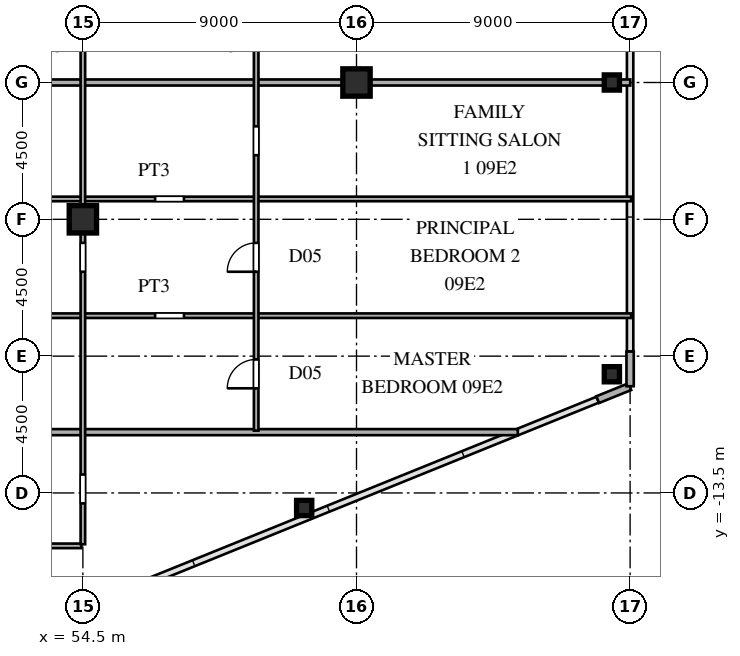
"""IFC4 building model, lengths in metres.
Left out: names, types, materials, properties, quantities, classifications, styles, units other than length and angle.
Written with IfcOpenShell. Run it as: python <this file> out.ifc"""

import sys

from ifc_helpers import new_model, si_unit, direction, frame, frame_2d, origin, origin_2d, place, context, subcontext, project, spatial, rectangle, hollow_rectangle, i_section, extrude, source, transform, mapped, element, fill, save


model = new_model("IFC4")
c1 = context("Model", 3, precision=1e-05, world=origin(), true_north=direction((0.0, 1.0)))
c2 = subcontext(c1, "Body", "Model", "MODEL_VIEW")
j1 = project(units=[si_unit("LENGTHUNIT", "METRE"), si_unit("PLANEANGLEUNIT", "RADIAN")], contexts=[c1])
p1 = place(None, origin())
s1 = spatial("IfcSite", under=j1, at=p1, CompositionType="ELEMENT")
p2 = place(p1, origin())
s2 = spatial("IfcBuilding", under=s1, at=p2, CompositionType="ELEMENT")
p3 = place(p2, frame((0.0, 0.0, 36.9)))
s3 = spatial("IfcBuildingStorey", under=s2, at=p3, CompositionType="ELEMENT", Elevation=36.9)
m1 = source(origin(), c2, "Body", "SweptSolid", [
    extrude(i_section(OverallWidth=0.9, OverallDepth=0.9, WebThickness=0.036, FlangeThickness=0.055, at=origin_2d()), origin(), (0.0, 0.0, 1.0), 3.6),
])
for number, where, z_axis, x_axis in (
    (1, (54.5, -4.5, 0.0), (0.0, 0.0, 1.0), (1.0, 0.0, 0.0)),
    (2, (63.5, 0.0, 0.0), (0.0, 0.0, 1.0), (1.0, 0.0, 0.0)),
):
    element("IfcColumn", number, at=place(p3, frame(where, z_axis=z_axis, x_axis=x_axis)), inside=s3, PredefinedType="COLUMN", context=c2, shape_type="MappedRepresentation", body=[
        mapped(m1, transform((0.0, 0.0, 0.0), scale=1.0)),
    ])
m2 = source(origin(), c2, "Body", "SweptSolid", [
    extrude(hollow_rectangle(XDim=0.5, YDim=0.5, WallThickness=0.02, at=origin_2d()), origin(), (0.0, 0.0, 1.0), 3.6),
])
for number, where, z_axis, x_axis in (
    (3, (71.9, -9.596, 0.0), (0.0, 0.0, 1.0), (1.0, 0.0, 0.0)),
    (4, (61.779, -13.994, 0.0), (0.0, 0.0, 1.0), (1.0, 0.0, 0.0)),
    (5, (71.9, 0.0, 0.0), (0.0, 0.0, 1.0), (1.0, 0.0, 0.0)),
):
    element("IfcColumn", number, at=place(p3, frame(where, z_axis=z_axis, x_axis=x_axis)), inside=s3, PredefinedType="COLUMN", context=c2, shape_type="MappedRepresentation", body=[
        mapped(m2, transform((0.0, 0.0, 0.0), scale=1.0)),
    ])
for number, where, z_axis, x_axis in (
    (6, (71.434, -10.431, 0.0), (0.0, 0.0, 1.0), (0.927, 0.375, 0.0)),
    (7, (72.5, -9.99, 0.0), (0.0, 0.0, 1.0), (0.0, 1.0, 0.0)),
):
    element("IfcWall", number, at=place(p3, frame(where, z_axis=z_axis, x_axis=x_axis)), inside=s3, PredefinedType="SOLIDWALL", context=c2, shape_type="SweptSolid", body=[
        extrude(rectangle(XDim=1.14, YDim=0.24, at=frame_2d((0.57, 0.0))), origin(), (0.0, 0.0, 1.0), 3.38),
    ])
p4 = place(p3, frame((41.15, -15.24, 0.0), z_axis=(0.0, 0.0, 1.0), x_axis=(1.0, 0.0, 0.0)))
e8 = element("IfcWall", 8, at=p4, inside=s3, PredefinedType="PARTITIONING", context=c2, shape_type="SweptSolid", body=[
    extrude(rectangle(XDim=13.3, YDim=0.15, at=frame_2d((6.65, 0.0))), origin(), (0.0, 0.0, 1.0), 3.38),
])
p5 = place(p4, frame((6.175, 0.0, 0.0)))
e9 = element("IfcOpeningElement", 9, at=p5, cuts=e8, PredefinedType="OPENING", context=c2, shape_type="SweptSolid", body=[
    extrude(rectangle(XDim=0.95, YDim=2.15, at=frame_2d((0.475, 1.075))), frame((0.0, 0.085, 0.0), z_axis=(0.0, -1.0, 0.0), x_axis=(1.0, 0.0, 0.0)), (0.0, 0.0, 1.0), 0.17),
])
p6 = place(p3, frame((38.43, -11.5, 0.0), z_axis=(0.0, 0.0, 1.0), x_axis=(1.0, 0.0, 0.0)))
e10 = element("IfcWall", 10, at=p6, inside=s3, PredefinedType="PARTITIONING", context=c2, shape_type="SweptSolid", body=[
    extrude(rectangle(XDim=30.377, YDim=0.2, at=frame_2d((15.188, 0.0))), origin(), (0.0, 0.0, 1.0), 3.38),
])
p7 = place(p3, frame((41.15, -7.67, 0.0), z_axis=(0.0, 0.0, 1.0), x_axis=(1.0, 0.0, 0.0)))
e11 = element("IfcWall", 11, at=p7, inside=s3, PredefinedType="PARTITIONING", context=c2, shape_type="SweptSolid", body=[
    extrude(rectangle(XDim=31.385, YDim=0.15, at=frame_2d((15.692, 0.0))), origin(), (0.0, 0.0, 1.0), 3.38),
])
p8 = place(p7, frame((6.175, 0.0, 0.0)))
e12 = element("IfcOpeningElement", 12, at=p8, cuts=e11, PredefinedType="OPENING", context=c2, shape_type="SweptSolid", body=[
    extrude(rectangle(XDim=0.95, YDim=2.15, at=frame_2d((0.475, 1.075))), frame((0.0, 0.085, 0.0), z_axis=(0.0, -1.0, 0.0), x_axis=(1.0, 0.0, 0.0)), (0.0, 0.0, 1.0), 0.17),
])
p9 = place(p7, frame((15.725, 0.0, 0.0)))
e13 = element("IfcOpeningElement", 13, at=p9, cuts=e11, PredefinedType="OPENING", context=c2, shape_type="SweptSolid", body=[
    extrude(rectangle(XDim=0.95, YDim=2.15, at=frame_2d((0.475, 1.075))), frame((0.0, 0.085, 0.0), z_axis=(0.0, -1.0, 0.0), x_axis=(1.0, 0.0, 0.0)), (0.0, 0.0, 1.0), 0.17),
])
p10 = place(p3, frame((41.15, -3.83, 0.0), z_axis=(0.0, 0.0, 1.0), x_axis=(1.0, 0.0, 0.0)))
e14 = element("IfcWall", 14, at=p10, inside=s3, PredefinedType="PARTITIONING", context=c2, shape_type="SweptSolid", body=[
    extrude(rectangle(XDim=31.385, YDim=0.15, at=frame_2d((15.692, 0.0))), origin(), (0.0, 0.0, 1.0), 3.38),
])
p11 = place(p10, frame((6.175, 0.0, 0.0)))
e15 = element("IfcOpeningElement", 15, at=p11, cuts=e14, PredefinedType="OPENING", context=c2, shape_type="SweptSolid", body=[
    extrude(rectangle(XDim=0.95, YDim=2.15, at=frame_2d((0.475, 1.075))), frame((0.0, 0.085, 0.0), z_axis=(0.0, -1.0, 0.0), x_axis=(1.0, 0.0, 0.0)), (0.0, 0.0, 1.0), 0.17),
])
p12 = place(p10, frame((15.725, 0.0, 0.0)))
e16 = element("IfcOpeningElement", 16, at=p12, cuts=e14, PredefinedType="OPENING", context=c2, shape_type="SweptSolid", body=[
    extrude(rectangle(XDim=0.95, YDim=2.15, at=frame_2d((0.475, 1.075))), frame((0.0, 0.085, 0.0), z_axis=(0.0, -1.0, 0.0), x_axis=(1.0, 0.0, 0.0)), (0.0, 0.0, 1.0), 0.17),
])
p13 = place(p3, frame((38.43, 0.0, 0.0), z_axis=(0.0, 0.0, 1.0), x_axis=(1.0, 0.0, 0.0)))
e17 = element("IfcWall", 17, at=p13, inside=s3, PredefinedType="PARTITIONING", context=c2, shape_type="SweptSolid", body=[
    extrude(rectangle(XDim=25.05, YDim=0.2, at=frame_2d((12.525, 0.0))), origin(), (0.0, 0.0, 1.0), 3.38),
])
p14 = place(p3, frame((63.48, 0.0, 0.0), z_axis=(0.0, 0.0, 1.0), x_axis=(1.0, 0.0, 0.0)))
e18 = element("IfcWall", 18, at=p14, inside=s3, PredefinedType="PARTITIONING", context=c2, shape_type="SweptSolid", body=[
    extrude(rectangle(XDim=9.025, YDim=0.2, at=frame_2d((4.512, 0.0))), origin(), (0.0, 0.0, 1.0), 2.68),
])
p15 = place(p3, frame((54.5, -15.186, 0.0), z_axis=(0.0, 0.0, 1.0), x_axis=(0.0, 1.0, 0.0)))
e19 = element("IfcWall", 19, at=p15, inside=s3, PredefinedType="PARTITIONING", context=c2, shape_type="SweptSolid", body=[
    extrude(rectangle(XDim=30.372, YDim=0.15, at=frame_2d((15.186, 0.0))), origin(), (0.0, 0.0, 1.0), 2.68),
])
p16 = place(p15, frame((1.343, 0.0, 0.0)))
e20 = element("IfcOpeningElement", 20, at=p16, cuts=e19, PredefinedType="OPENING", context=c2, shape_type="SweptSolid", body=[
    extrude(rectangle(XDim=0.95, YDim=2.15, at=frame_2d((0.475, 1.075))), frame((0.0, 0.085, 0.0), z_axis=(0.0, -1.0, 0.0), x_axis=(1.0, 0.0, 0.0)), (0.0, 0.0, 1.0), 0.17),
])
p17 = place(p15, frame((8.961, 0.0, 0.0)))
e21 = element("IfcOpeningElement", 21, at=p17, cuts=e19, PredefinedType="OPENING", context=c2, shape_type="SweptSolid", body=[
    extrude(rectangle(XDim=0.95, YDim=2.15, at=frame_2d((0.475, 1.075))), frame((0.0, 0.085, 0.0), z_axis=(0.0, -1.0, 0.0), x_axis=(1.0, 0.0, 0.0)), (0.0, 0.0, 1.0), 0.17),
])
p18 = place(p15, frame((20.461, 0.0, 0.0)))
e22 = element("IfcOpeningElement", 22, at=p18, cuts=e19, PredefinedType="OPENING", context=c2, shape_type="SweptSolid", body=[
    extrude(rectangle(XDim=0.95, YDim=2.15, at=frame_2d((0.475, 1.075))), frame((0.0, 0.085, 0.0), z_axis=(0.0, -1.0, 0.0), x_axis=(1.0, 0.0, 0.0)), (0.0, 0.0, 1.0), 0.17),
])
p19 = place(p15, frame((28.079, 0.0, 0.0)))
e23 = element("IfcOpeningElement", 23, at=p19, cuts=e19, PredefinedType="OPENING", context=c2, shape_type="SweptSolid", body=[
    extrude(rectangle(XDim=0.95, YDim=2.15, at=frame_2d((0.475, 1.075))), frame((0.0, 0.085, 0.0), z_axis=(0.0, -1.0, 0.0), x_axis=(1.0, 0.0, 0.0)), (0.0, 0.0, 1.0), 0.17),
])
p20 = place(p3, frame((60.2, -11.45, 0.0), z_axis=(0.0, 0.0, 1.0), x_axis=(0.0, 1.0, 0.0)))
e24 = element("IfcWall", 24, at=p20, inside=s3, PredefinedType="PARTITIONING", context=c2, shape_type="SweptSolid", body=[
    extrude(rectangle(XDim=22.9, YDim=0.15, at=frame_2d((11.45, 0.0))), origin(), (0.0, 0.0, 1.0), 3.38),
])
p21 = place(p20, frame((1.392, 0.0, 0.0)))
e25 = element("IfcOpeningElement", 25, at=p21, cuts=e24, PredefinedType="OPENING", context=c2, shape_type="SweptSolid", body=[
    extrude(rectangle(XDim=0.95, YDim=2.15, at=frame_2d((0.475, 1.075))), frame((0.0, 0.085, 0.0), z_axis=(0.0, -1.0, 0.0), x_axis=(1.0, 0.0, 0.0)), (0.0, 0.0, 1.0), 0.17),
])
p22 = place(p20, frame((5.225, 0.0, 0.0)))
e26 = element("IfcOpeningElement", 26, at=p22, cuts=e24, PredefinedType="OPENING", context=c2, shape_type="SweptSolid", body=[
    extrude(rectangle(XDim=0.95, YDim=2.15, at=frame_2d((0.475, 1.075))), frame((0.0, 0.085, 0.0), z_axis=(0.0, -1.0, 0.0), x_axis=(1.0, 0.0, 0.0)), (0.0, 0.0, 1.0), 0.17),
])
p23 = place(p20, frame((9.058, 0.0, 0.0)))
e27 = element("IfcOpeningElement", 27, at=p23, cuts=e24, PredefinedType="OPENING", context=c2, shape_type="SweptSolid", body=[
    extrude(rectangle(XDim=0.95, YDim=2.15, at=frame_2d((0.475, 1.075))), frame((0.0, 0.085, 0.0), z_axis=(0.0, -1.0, 0.0), x_axis=(1.0, 0.0, 0.0)), (0.0, 0.0, 1.0), 0.17),
])
p24 = place(p20, frame((12.892, 0.0, 0.0)))
e28 = element("IfcOpeningElement", 28, at=p24, cuts=e24, PredefinedType="OPENING", context=c2, shape_type="SweptSolid", body=[
    extrude(rectangle(XDim=0.95, YDim=2.15, at=frame_2d((0.475, 1.075))), frame((0.0, 0.085, 0.0), z_axis=(0.0, -1.0, 0.0), x_axis=(1.0, 0.0, 0.0)), (0.0, 0.0, 1.0), 0.17),
])
p25 = place(p20, frame((16.725, 0.0, 0.0)))
e29 = element("IfcOpeningElement", 29, at=p25, cuts=e24, PredefinedType="OPENING", context=c2, shape_type="SweptSolid", body=[
    extrude(rectangle(XDim=0.95, YDim=2.15, at=frame_2d((0.475, 1.075))), frame((0.0, 0.085, 0.0), z_axis=(0.0, -1.0, 0.0), x_axis=(1.0, 0.0, 0.0)), (0.0, 0.0, 1.0), 0.17),
])
p26 = place(p20, frame((20.558, 0.0, 0.0)))
e30 = element("IfcOpeningElement", 30, at=p26, cuts=e24, PredefinedType="OPENING", context=c2, shape_type="SweptSolid", body=[
    extrude(rectangle(XDim=0.95, YDim=2.15, at=frame_2d((0.475, 1.075))), frame((0.0, 0.085, 0.0), z_axis=(0.0, -1.0, 0.0), x_axis=(1.0, 0.0, 0.0)), (0.0, 0.0, 1.0), 0.17),
])
m3 = source(origin(), c2, "Body", "SweptSolid", [
    extrude(rectangle(XDim=0.95, YDim=2.15, at=frame_2d((0.475, 1.075))), frame((0.0, 0.025, 0.0), z_axis=(0.0, -1.0, 0.0), x_axis=(1.0, 0.0, 0.0)), (0.0, 0.0, 1.0), 0.05),
])
p27 = place(p21, origin())
e31 = element("IfcDoor", 31, at=p27, inside=s3, OperationType="SINGLE_SWING_LEFT", PredefinedType="DOOR", context=c2, shape_type="MappedRepresentation", body=[
    mapped(m3, transform((0.0, 0.0, 0.0), scale=1.0)),
])
fill(e25, e31)
p28 = place(p22, origin())
e32 = element("IfcDoor", 32, at=p28, inside=s3, OperationType="SINGLE_SWING_LEFT", PredefinedType="DOOR", context=c2, shape_type="MappedRepresentation", body=[
    mapped(m3, transform((0.0, 0.0, 0.0), scale=1.0)),
])
fill(e26, e32)
save(model, sys.argv[1])
